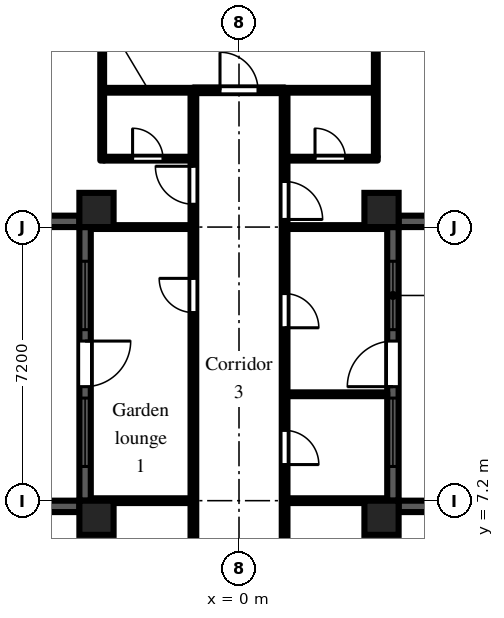
"""IFC4 building model, lengths in metres.
Left out: names, types, materials, properties, quantities, classifications, styles, units other than length and angle.
Written with IfcOpenShell. Run it as: python <this file> out.ifc"""

import sys

from ifc_helpers import new_model, si_unit, direction, frame, frame_2d, origin, origin_2d, place, context, subcontext, project, spatial, rectangle, extrude, element, fill, save


model = new_model("IFC4")
c1 = context("Model", 3, precision=1e-05, world=origin(), true_north=direction((0.0, 1.0)))
c2 = subcontext(c1, "Body", "Model", "MODEL_VIEW")
j1 = project(units=[si_unit("LENGTHUNIT", "METRE"), si_unit("PLANEANGLEUNIT", "RADIAN")], contexts=[c1])
p1 = place(None, origin())
s1 = spatial("IfcSite", under=j1, at=p1, CompositionType="ELEMENT")
p2 = place(p1, origin())
s2 = spatial("IfcBuilding", under=s1, at=p2, CompositionType="ELEMENT")
p3 = place(p2, frame((0.0, 0.0, 69.9)))
s3 = spatial("IfcBuildingStorey", under=s2, at=p3, CompositionType="ELEMENT", Elevation=69.9)
for number, where, z_axis, x_axis in (
    (1, (-3.75, 6.75, 0.0), (0.0, 0.0, 1.0), (1.0, 0.0, 0.0)),
    (2, (-3.75, 14.85, 0.0), (0.0, 0.0, 1.0), (1.0, 0.0, 0.0)),
    (3, (3.75, 6.75, 0.0), (0.0, 0.0, 1.0), (1.0, 0.0, 0.0)),
    (4, (3.75, 14.85, 0.0), (0.0, 0.0, 1.0), (1.0, 0.0, 0.0)),
):
    element("IfcColumn", number, at=place(p3, frame(where, z_axis=z_axis, x_axis=x_axis)), inside=s3, PredefinedType="COLUMN", context=c2, shape_type="SweptSolid", body=[
        extrude(rectangle(XDim=0.9, YDim=0.9, at=origin_2d()), origin(), (0.0, 0.0, 1.0), 3.0),
    ])
p4 = place(p3, frame((7.2, 7.05, 0.0), z_axis=(0.0, 0.0, 1.0), x_axis=(-1.0, 0.0, 0.0)))
e5 = element("IfcWall", 5, at=p4, inside=s3, PredefinedType="SOLIDWALL", context=c2, shape_type="SweptSolid", body=[
    extrude(rectangle(XDim=3.0, YDim=0.3, at=frame_2d((1.5, 0.0))), origin(), (0.0, 0.0, 1.0), 2.1),
])
p5 = place(p3, frame((4.05, 7.2, 0.0), z_axis=(0.0, 0.0, 1.0), x_axis=(0.0, 1.0, 0.0)))
e6 = element("IfcWall", 6, at=p5, inside=s3, PredefinedType="SOLIDWALL", context=c2, shape_type="SweptSolid", body=[
    extrude(rectangle(XDim=7.2, YDim=0.3, at=frame_2d((3.6, 0.0))), origin(), (0.0, 0.0, 1.0), 2.1),
])
p6 = place(p5, frame((3.0, 0.0, 0.0)))
e7 = element("IfcOpeningElement", 7, at=p6, cuts=e6, PredefinedType="OPENING", context=c2, shape_type="SweptSolid", body=[
    extrude(rectangle(XDim=1.2, YDim=2.05, at=frame_2d((0.6, 1.025))), frame((0.0, 0.16, 0.0), z_axis=(0.0, -1.0, 0.0), x_axis=(1.0, 0.0, 0.0)), (0.0, 0.0, 1.0), 0.32),
])
p7 = place(p5, frame((0.9, 0.0, 0.2)))
e8 = element("IfcOpeningElement", 8, at=p7, cuts=e6, PredefinedType="OPENING", context=c2, shape_type="SweptSolid", body=[
    extrude(rectangle(XDim=1.8, YDim=1.85, at=frame_2d((0.9, 0.925))), frame((0.0, 0.16, 0.0), z_axis=(0.0, -1.0, 0.0), x_axis=(1.0, 0.0, 0.0)), (0.0, 0.0, 1.0), 0.32),
])
p8 = place(p5, frame((4.5, 0.0, 0.2)))
e9 = element("IfcOpeningElement", 9, at=p8, cuts=e6, PredefinedType="OPENING", context=c2, shape_type="SweptSolid", body=[
    extrude(rectangle(XDim=1.8, YDim=1.85, at=frame_2d((0.9, 0.925))), frame((0.0, 0.16, 0.0), z_axis=(0.0, -1.0, 0.0), x_axis=(1.0, 0.0, 0.0)), (0.0, 0.0, 1.0), 0.32),
])
for number, where, z_axis, x_axis in (
    (10, (4.2, 14.55, 0.0), (0.0, 0.0, 1.0), (1.0, 0.0, 0.0)),
    (11, (-6.3, 14.55, 0.0), (0.0, 0.0, 1.0), (1.0, 0.0, 0.0)),
):
    element("IfcWall", number, at=place(p3, frame(where, z_axis=z_axis, x_axis=x_axis)), inside=s3, PredefinedType="SOLIDWALL", context=c2, shape_type="SweptSolid", body=[
        extrude(rectangle(XDim=2.1, YDim=0.3, at=frame_2d((1.05, 0.0))), origin(), (0.0, 0.0, 1.0), 2.1),
    ])
p9 = place(p3, frame((-4.05, 14.4, 0.0), z_axis=(0.0, 0.0, 1.0), x_axis=(0.0, -1.0, 0.0)))
e12 = element("IfcWall", 12, at=p9, inside=s3, PredefinedType="SOLIDWALL", context=c2, shape_type="SweptSolid", body=[
    extrude(rectangle(XDim=7.2, YDim=0.3, at=frame_2d((3.6, 0.0))), origin(), (0.0, 0.0, 1.0), 2.1),
])
p10 = place(p9, frame((3.0, 0.0, 0.0)))
e13 = element("IfcOpeningElement", 13, at=p10, cuts=e12, PredefinedType="OPENING", context=c2, shape_type="SweptSolid", body=[
    extrude(rectangle(XDim=1.2, YDim=2.05, at=frame_2d((0.6, 1.025))), frame((0.0, 0.16, 0.0), z_axis=(0.0, -1.0, 0.0), x_axis=(1.0, 0.0, 0.0)), (0.0, 0.0, 1.0), 0.32),
])
p11 = place(p9, frame((0.9, 0.0, 0.2)))
e14 = element("IfcOpeningElement", 14, at=p11, cuts=e12, PredefinedType="OPENING", context=c2, shape_type="SweptSolid", body=[
    extrude(rectangle(XDim=1.8, YDim=1.85, at=frame_2d((0.9, 0.925))), frame((0.0, 0.16, 0.0), z_axis=(0.0, -1.0, 0.0), x_axis=(1.0, 0.0, 0.0)), (0.0, 0.0, 1.0), 0.32),
])
p12 = place(p9, frame((4.5, 0.0, 0.2)))
e15 = element("IfcOpeningElement", 15, at=p12, cuts=e12, PredefinedType="OPENING", context=c2, shape_type="SweptSolid", body=[
    extrude(rectangle(XDim=1.8, YDim=1.85, at=frame_2d((0.9, 0.925))), frame((0.0, 0.16, 0.0), z_axis=(0.0, -1.0, 0.0), x_axis=(1.0, 0.0, 0.0)), (0.0, 0.0, 1.0), 0.32),
])
p13 = place(p3, frame((-4.2, 7.05, 0.0), z_axis=(0.0, 0.0, 1.0), x_axis=(-1.0, 0.0, 0.0)))
e16 = element("IfcWall", 16, at=p13, inside=s3, PredefinedType="SOLIDWALL", context=c2, shape_type="SweptSolid", body=[
    extrude(rectangle(XDim=3.0, YDim=0.3, at=frame_2d((1.5, 0.0))), origin(), (0.0, 0.0, 1.0), 2.1),
])
p14 = place(p3, frame((-3.9, 7.2, 0.0), z_axis=(0.0, 0.0, 1.0), x_axis=(1.0, 0.0, 0.0)))
e17 = element("IfcWall", 17, at=p14, inside=s3, PredefinedType="PARTITIONING", context=c2, shape_type="SweptSolid", body=[
    extrude(rectangle(XDim=2.625, YDim=0.125, at=frame_2d((1.312, 0.0))), origin(), (0.0, 0.0, 1.0), 2.575),
])
p15 = place(p3, frame((-3.9, 14.4, 0.0), z_axis=(0.0, 0.0, 1.0), x_axis=(1.0, 0.0, 0.0)))
e18 = element("IfcWall", 18, at=p15, inside=s3, PredefinedType="PARTITIONING", context=c2, shape_type="SweptSolid", body=[
    extrude(rectangle(XDim=2.625, YDim=0.1, at=frame_2d((1.312, 0.0))), origin(), (0.0, 0.0, 1.0), 2.575),
])
p16 = place(p3, frame((-3.6, 16.15, 0.0), z_axis=(0.0, 0.0, 1.0), x_axis=(0.0, 1.0, 0.0)))
e19 = element("IfcWall", 19, at=p16, inside=s3, PredefinedType="PARTITIONING", context=c2, shape_type="SweptSolid", body=[
    extrude(rectangle(XDim=3.35, YDim=0.1, at=frame_2d((1.675, 0.0))), origin(), (0.0, 0.0, 1.0), 2.575),
])
p17 = place(p3, frame((-3.55, 16.2, 0.0), z_axis=(0.0, 0.0, 1.0), x_axis=(1.0, 0.0, 0.0)))
e20 = element("IfcWall", 20, at=p17, inside=s3, PredefinedType="PARTITIONING", context=c2, shape_type="SweptSolid", body=[
    extrude(rectangle(XDim=2.275, YDim=0.1, at=frame_2d((1.138, 0.0))), origin(), (0.0, 0.0, 1.0), 2.575),
])
p18 = place(p17, frame((0.75, 0.0, 0.0)))
e21 = element("IfcOpeningElement", 21, at=p18, cuts=e20, PredefinedType="OPENING", context=c2, shape_type="SweptSolid", body=[
    extrude(rectangle(XDim=0.8, YDim=2.1, at=frame_2d((0.4, 1.05))), frame((0.0, 0.06, 0.0), z_axis=(0.0, -1.0, 0.0), x_axis=(1.0, 0.0, 0.0)), (0.0, 0.0, 1.0), 0.12),
])
p19 = place(p3, frame((-3.55, 18.0, 0.0), z_axis=(0.0, 0.0, 1.0), x_axis=(1.0, 0.0, 0.0)))
e22 = element("IfcWall", 22, at=p19, inside=s3, PredefinedType="PARTITIONING", context=c2, shape_type="SweptSolid", body=[
    extrude(rectangle(XDim=2.35, YDim=0.125, at=frame_2d((1.175, 0.0))), origin(), (0.0, 0.0, 1.0), 2.575),
])
p20 = place(p3, frame((-1.2, 1.275, 0.0), z_axis=(0.0, 0.0, 1.0), x_axis=(0.0, 1.0, 0.0)))
e23 = element("IfcWall", 23, at=p20, inside=s3, PredefinedType="PARTITIONING", context=c2, shape_type="SweptSolid", body=[
    extrude(rectangle(XDim=16.65, YDim=0.15, at=frame_2d((8.325, 0.0))), origin(), (0.0, 0.0, 1.0), 2.575),
])
p21 = place(p20, frame((0.675, 0.0, 0.0)))
e24 = element("IfcOpeningElement", 24, at=p21, cuts=e23, PredefinedType="OPENING", context=c2, shape_type="SweptSolid", body=[
    extrude(rectangle(XDim=0.9, YDim=2.1, at=frame_2d((0.45, 1.05))), frame((0.0, 0.085, 0.0), z_axis=(0.0, -1.0, 0.0), x_axis=(1.0, 0.0, 0.0)), (0.0, 0.0, 1.0), 0.17),
])
p22 = place(p20, frame((3.675, 0.0, 0.0)))
e25 = element("IfcOpeningElement", 25, at=p22, cuts=e23, PredefinedType="OPENING", context=c2, shape_type="SweptSolid", body=[
    extrude(rectangle(XDim=0.9, YDim=2.1, at=frame_2d((0.45, 1.05))), frame((0.0, 0.085, 0.0), z_axis=(0.0, -1.0, 0.0), x_axis=(1.0, 0.0, 0.0)), (0.0, 0.0, 1.0), 0.17),
])
p23 = place(p20, frame((10.875, 0.0, 0.0)))
e26 = element("IfcOpeningElement", 26, at=p23, cuts=e23, PredefinedType="OPENING", context=c2, shape_type="SweptSolid", body=[
    extrude(rectangle(XDim=0.9, YDim=2.1, at=frame_2d((0.45, 1.05))), frame((0.0, 0.085, 0.0), z_axis=(0.0, -1.0, 0.0), x_axis=(1.0, 0.0, 0.0)), (0.0, 0.0, 1.0), 0.17),
])
p24 = place(p20, frame((13.725, 0.0, 0.0)))
e27 = element("IfcOpeningElement", 27, at=p24, cuts=e23, PredefinedType="OPENING", context=c2, shape_type="SweptSolid", body=[
    extrude(rectangle(XDim=1.0, YDim=2.1, at=frame_2d((0.5, 1.05))), frame((0.0, 0.085, 0.0), z_axis=(0.0, -1.0, 0.0), x_axis=(1.0, 0.0, 0.0)), (0.0, 0.0, 1.0), 0.17),
])
p25 = place(p3, frame((-1.2, 18.0, 0.0), z_axis=(0.0, 0.0, 1.0), x_axis=(1.0, 0.0, 0.0)))
e28 = element("IfcWall", 28, at=p25, inside=s3, PredefinedType="PARTITIONING", context=c2, shape_type="SweptSolid", body=[
    extrude(rectangle(XDim=2.4, YDim=0.15, at=frame_2d((1.2, 0.0))), origin(), (0.0, 0.0, 1.0), 2.575),
])
p26 = place(p25, frame((0.7, 0.0, 0.0)))
e29 = element("IfcOpeningElement", 29, at=p26, cuts=e28, PredefinedType="OPENING", context=c2, shape_type="SweptSolid", body=[
    extrude(rectangle(XDim=1.0, YDim=2.1, at=frame_2d((0.5, 1.05))), frame((0.0, 0.085, 0.0), z_axis=(0.0, -1.0, 0.0), x_axis=(1.0, 0.0, 0.0)), (0.0, 0.0, 1.0), 0.17),
])
p27 = place(p3, frame((1.2, 1.125, 0.0), z_axis=(0.0, 0.0, 1.0), x_axis=(0.0, 1.0, 0.0)))
e30 = element("IfcWall", 30, at=p27, inside=s3, PredefinedType="PARTITIONING", context=c2, shape_type="SweptSolid", body=[
    extrude(rectangle(XDim=16.8, YDim=0.15, at=frame_2d((8.4, 0.0))), origin(), (0.0, 0.0, 1.0), 2.575),
])
p28 = place(p27, frame((7.025, 0.0, 0.0)))
e31 = element("IfcOpeningElement", 31, at=p28, cuts=e30, PredefinedType="OPENING", context=c2, shape_type="SweptSolid", body=[
    extrude(rectangle(XDim=0.9, YDim=2.1, at=frame_2d((0.45, 1.05))), frame((0.0, 0.085, 0.0), z_axis=(0.0, -1.0, 0.0), x_axis=(1.0, 0.0, 0.0)), (0.0, 0.0, 1.0), 0.17),
])
p29 = place(p27, frame((10.625, 0.0, 0.0)))
e32 = element("IfcOpeningElement", 32, at=p29, cuts=e30, PredefinedType="OPENING", context=c2, shape_type="SweptSolid", body=[
    extrude(rectangle(XDim=0.9, YDim=2.1, at=frame_2d((0.45, 1.05))), frame((0.0, 0.085, 0.0), z_axis=(0.0, -1.0, 0.0), x_axis=(1.0, 0.0, 0.0)), (0.0, 0.0, 1.0), 0.17),
])
p30 = place(p27, frame((13.475, 0.0, 0.0)))
e33 = element("IfcOpeningElement", 33, at=p30, cuts=e30, PredefinedType="OPENING", context=c2, shape_type="SweptSolid", body=[
    extrude(rectangle(XDim=1.0, YDim=2.1, at=frame_2d((0.5, 1.05))), frame((0.0, 0.085, 0.0), z_axis=(0.0, -1.0, 0.0), x_axis=(1.0, 0.0, 0.0)), (0.0, 0.0, 1.0), 0.17),
])
p31 = place(p3, frame((1.275, 7.2, 0.0), z_axis=(0.0, 0.0, 1.0), x_axis=(1.0, 0.0, 0.0)))
e34 = element("IfcWall", 34, at=p31, inside=s3, PredefinedType="PARTITIONING", context=c2, shape_type="SweptSolid", body=[
    extrude(rectangle(XDim=2.625, YDim=0.125, at=frame_2d((1.312, 0.0))), origin(), (0.0, 0.0, 1.0), 2.575),
])
for number, where, z_axis, x_axis in (
    (35, (1.275, 10.0, 0.0), (0.0, 0.0, 1.0), (1.0, 0.0, 0.0)),
    (36, (1.275, 14.4, 0.0), (0.0, 0.0, 1.0), (1.0, 0.0, 0.0)),
):
    element("IfcWall", number, at=place(p3, frame(where, z_axis=z_axis, x_axis=x_axis)), inside=s3, PredefinedType="PARTITIONING", context=c2, shape_type="SweptSolid", body=[
        extrude(rectangle(XDim=2.625, YDim=0.1, at=frame_2d((1.312, 0.0))), origin(), (0.0, 0.0, 1.0), 2.575),
    ])
p32 = place(p3, frame((1.275, 16.2, 0.0), z_axis=(0.0, 0.0, 1.0), x_axis=(1.0, 0.0, 0.0)))
e37 = element("IfcWall", 37, at=p32, inside=s3, PredefinedType="PARTITIONING", context=c2, shape_type="SweptSolid", body=[
    extrude(rectangle(XDim=2.375, YDim=0.1, at=frame_2d((1.188, 0.0))), origin(), (0.0, 0.0, 1.0), 2.575),
])
p33 = place(p32, frame((0.725, 0.0, 0.0)))
e38 = element("IfcOpeningElement", 38, at=p33, cuts=e37, PredefinedType="OPENING", context=c2, shape_type="SweptSolid", body=[
    extrude(rectangle(XDim=0.8, YDim=2.1, at=frame_2d((0.4, 1.05))), frame((0.0, 0.06, 0.0), z_axis=(0.0, -1.0, 0.0), x_axis=(1.0, 0.0, 0.0)), (0.0, 0.0, 1.0), 0.12),
])
p34 = place(p3, frame((1.2, 18.0, 0.0), z_axis=(0.0, 0.0, 1.0), x_axis=(1.0, 0.0, 0.0)))
e39 = element("IfcWall", 39, at=p34, inside=s3, PredefinedType="PARTITIONING", context=c2, shape_type="SweptSolid", body=[
    extrude(rectangle(XDim=2.35, YDim=0.125, at=frame_2d((1.175, 0.0))), origin(), (0.0, 0.0, 1.0), 2.575),
])
p35 = place(p3, frame((3.6, 16.25, 0.0), z_axis=(0.0, 0.0, 1.0), x_axis=(0.0, 1.0, 0.0)))
e40 = element("IfcWall", 40, at=p35, inside=s3, PredefinedType="PARTITIONING", context=c2, shape_type="SweptSolid", body=[
    extrude(rectangle(XDim=3.25, YDim=0.1, at=frame_2d((1.625, 0.0))), origin(), (0.0, 0.0, 1.0), 2.575),
])
p36 = place(p6, origin())
e41 = element("IfcDoor", 41, at=p36, inside=s3, OperationType="SINGLE_SWING_LEFT", PredefinedType="DOOR", context=c2, shape_type="SweptSolid", body=[
    extrude(rectangle(XDim=1.2, YDim=2.05, at=frame_2d((0.6, 1.025))), frame((0.0, 0.025, 0.0), z_axis=(0.0, -1.0, 0.0), x_axis=(1.0, 0.0, 0.0)), (0.0, 0.0, 1.0), 0.05),
])
fill(e7, e41)
p37 = place(p7, origin())
e42 = element("IfcWindow", 42, at=p37, inside=s3, PartitioningType="SINGLE_PANEL", PredefinedType="WINDOW", context=c2, shape_type="SweptSolid", body=[
    extrude(rectangle(XDim=1.8, YDim=1.85, at=frame_2d((0.9, 0.925))), frame((0.0, 0.03, 0.0), z_axis=(0.0, -1.0, 0.0), x_axis=(1.0, 0.0, 0.0)), (0.0, 0.0, 1.0), 0.06),
])
fill(e8, e42)
p38 = place(p8, origin())
e43 = element("IfcWindow", 43, at=p38, inside=s3, PartitioningType="SINGLE_PANEL", PredefinedType="WINDOW", context=c2, shape_type="SweptSolid", body=[
    extrude(rectangle(XDim=1.8, YDim=1.85, at=frame_2d((0.9, 0.925))), frame((0.0, 0.03, 0.0), z_axis=(0.0, -1.0, 0.0), x_axis=(1.0, 0.0, 0.0)), (0.0, 0.0, 1.0), 0.06),
])
fill(e9, e43)
p39 = place(p10, origin())
e44 = element("IfcDoor", 44, at=p39, inside=s3, OperationType="SINGLE_SWING_LEFT", PredefinedType="DOOR", context=c2, shape_type="SweptSolid", body=[
    extrude(rectangle(XDim=1.2, YDim=2.05, at=frame_2d((0.6, 1.025))), frame((0.0, 0.025, 0.0), z_axis=(0.0, -1.0, 0.0), x_axis=(1.0, 0.0, 0.0)), (0.0, 0.0, 1.0), 0.05),
])
fill(e13, e44)
p40 = place(p11, origin())
e45 = element("IfcWindow", 45, at=p40, inside=s3, PartitioningType="SINGLE_PANEL", PredefinedType="WINDOW", context=c2, shape_type="SweptSolid", body=[
    extrude(rectangle(XDim=1.8, YDim=1.85, at=frame_2d((0.9, 0.925))), frame((0.0, 0.03, 0.0), z_axis=(0.0, -1.0, 0.0), x_axis=(1.0, 0.0, 0.0)), (0.0, 0.0, 1.0), 0.06),
])
fill(e14, e45)
p41 = place(p12, origin())
e46 = element("IfcWindow", 46, at=p41, inside=s3, PartitioningType="SINGLE_PANEL", PredefinedType="WINDOW", context=c2, shape_type="SweptSolid", body=[
    extrude(rectangle(XDim=1.8, YDim=1.85, at=frame_2d((0.9, 0.925))), frame((0.0, 0.03, 0.0), z_axis=(0.0, -1.0, 0.0), x_axis=(1.0, 0.0, 0.0)), (0.0, 0.0, 1.0), 0.06),
])
fill(e15, e46)
p42 = place(p26, origin())
e47 = element("IfcDoor", 47, at=p42, inside=s3, OperationType="SINGLE_SWING_LEFT", PredefinedType="DOOR", context=c2, shape_type="SweptSolid", body=[
    extrude(rectangle(XDim=1.0, YDim=2.1, at=frame_2d((0.5, 1.05))), frame((0.0, 0.025, 0.0), z_axis=(0.0, -1.0, 0.0), x_axis=(1.0, 0.0, 0.0)), (0.0, 0.0, 1.0), 0.05),
])
fill(e29, e47)
p43 = place(p23, origin())
e48 = element("IfcDoor", 48, at=p43, inside=s3, OperationType="SINGLE_SWING_RIGHT", PredefinedType="DOOR", context=c2, shape_type="SweptSolid", body=[
    extrude(rectangle(XDim=0.9, YDim=2.1, at=frame_2d((0.45, 1.05))), frame((0.0, 0.025, 0.0), z_axis=(0.0, -1.0, 0.0), x_axis=(1.0, 0.0, 0.0)), (0.0, 0.0, 1.0), 0.05),
])
fill(e26, e48)
p44 = place(p18, origin())
e49 = element("IfcDoor", 49, at=p44, inside=s3, OperationType="SINGLE_SWING_LEFT", PredefinedType="DOOR", context=c2, shape_type="SweptSolid", body=[
    extrude(rectangle(XDim=0.8, YDim=2.1, at=frame_2d((0.4, 1.05))), frame((0.0, 0.025, 0.0), z_axis=(0.0, -1.0, 0.0), x_axis=(1.0, 0.0, 0.0)), (0.0, 0.0, 1.0), 0.05),
])
fill(e21, e49)
p45 = place(p24, origin())
e50 = element("IfcDoor", 50, at=p45, inside=s3, OperationType="SINGLE_SWING_RIGHT", PredefinedType="DOOR", context=c2, shape_type="SweptSolid", body=[
    extrude(rectangle(XDim=1.0, YDim=2.1, at=frame_2d((0.5, 1.05))), frame((0.0, 0.025, 0.0), z_axis=(0.0, -1.0, 0.0), x_axis=(1.0, 0.0, 0.0)), (0.0, 0.0, 1.0), 0.05),
])
fill(e27, e50)
p46 = place(p28, frame((0.9, 0.0, 0.0), z_axis=(0.0, 0.0, 1.0), x_axis=(-1.0, 0.0, 0.0)))
e51 = element("IfcDoor", 51, at=p46, inside=s3, OperationType="SINGLE_SWING_RIGHT", PredefinedType="DOOR", context=c2, shape_type="SweptSolid", body=[
    extrude(rectangle(XDim=0.9, YDim=2.1, at=frame_2d((0.45, 1.05))), frame((0.0, 0.025, 0.0), z_axis=(0.0, -1.0, 0.0), x_axis=(1.0, 0.0, 0.0)), (0.0, 0.0, 1.0), 0.05),
])
fill(e31, e51)
p47 = place(p29, frame((0.9, 0.0, 0.0), z_axis=(0.0, 0.0, 1.0), x_axis=(-1.0, 0.0, 0.0)))
e52 = element("IfcDoor", 52, at=p47, inside=s3, OperationType="SINGLE_SWING_RIGHT", PredefinedType="DOOR", context=c2, shape_type="SweptSolid", body=[
    extrude(rectangle(XDim=0.9, YDim=2.1, at=frame_2d((0.45, 1.05))), frame((0.0, 0.025, 0.0), z_axis=(0.0, -1.0, 0.0), x_axis=(1.0, 0.0, 0.0)), (0.0, 0.0, 1.0), 0.05),
])
fill(e32, e52)
p48 = place(p33, origin())
e53 = element("IfcDoor", 53, at=p48, inside=s3, OperationType="SINGLE_SWING_LEFT", PredefinedType="DOOR", context=c2, shape_type="SweptSolid", body=[
    extrude(rectangle(XDim=0.8, YDim=2.1, at=frame_2d((0.4, 1.05))), frame((0.0, 0.025, 0.0), z_axis=(0.0, -1.0, 0.0), x_axis=(1.0, 0.0, 0.0)), (0.0, 0.0, 1.0), 0.05),
])
fill(e38, e53)
p49 = place(p30, frame((1.0, 0.0, 0.0), z_axis=(0.0, 0.0, 1.0), x_axis=(-1.0, 0.0, 0.0)))
e54 = element("IfcDoor", 54, at=p49, inside=s3, OperationType="SINGLE_SWING_RIGHT", PredefinedType="DOOR", context=c2, shape_type="SweptSolid", body=[
    extrude(rectangle(XDim=1.0, YDim=2.1, at=frame_2d((0.5, 1.05))), frame((0.0, 0.025, 0.0), z_axis=(0.0, -1.0, 0.0), x_axis=(1.0, 0.0, 0.0)), (0.0, 0.0, 1.0), 0.05),
])
fill(e33, e54)
save(model, sys.argv[1])
